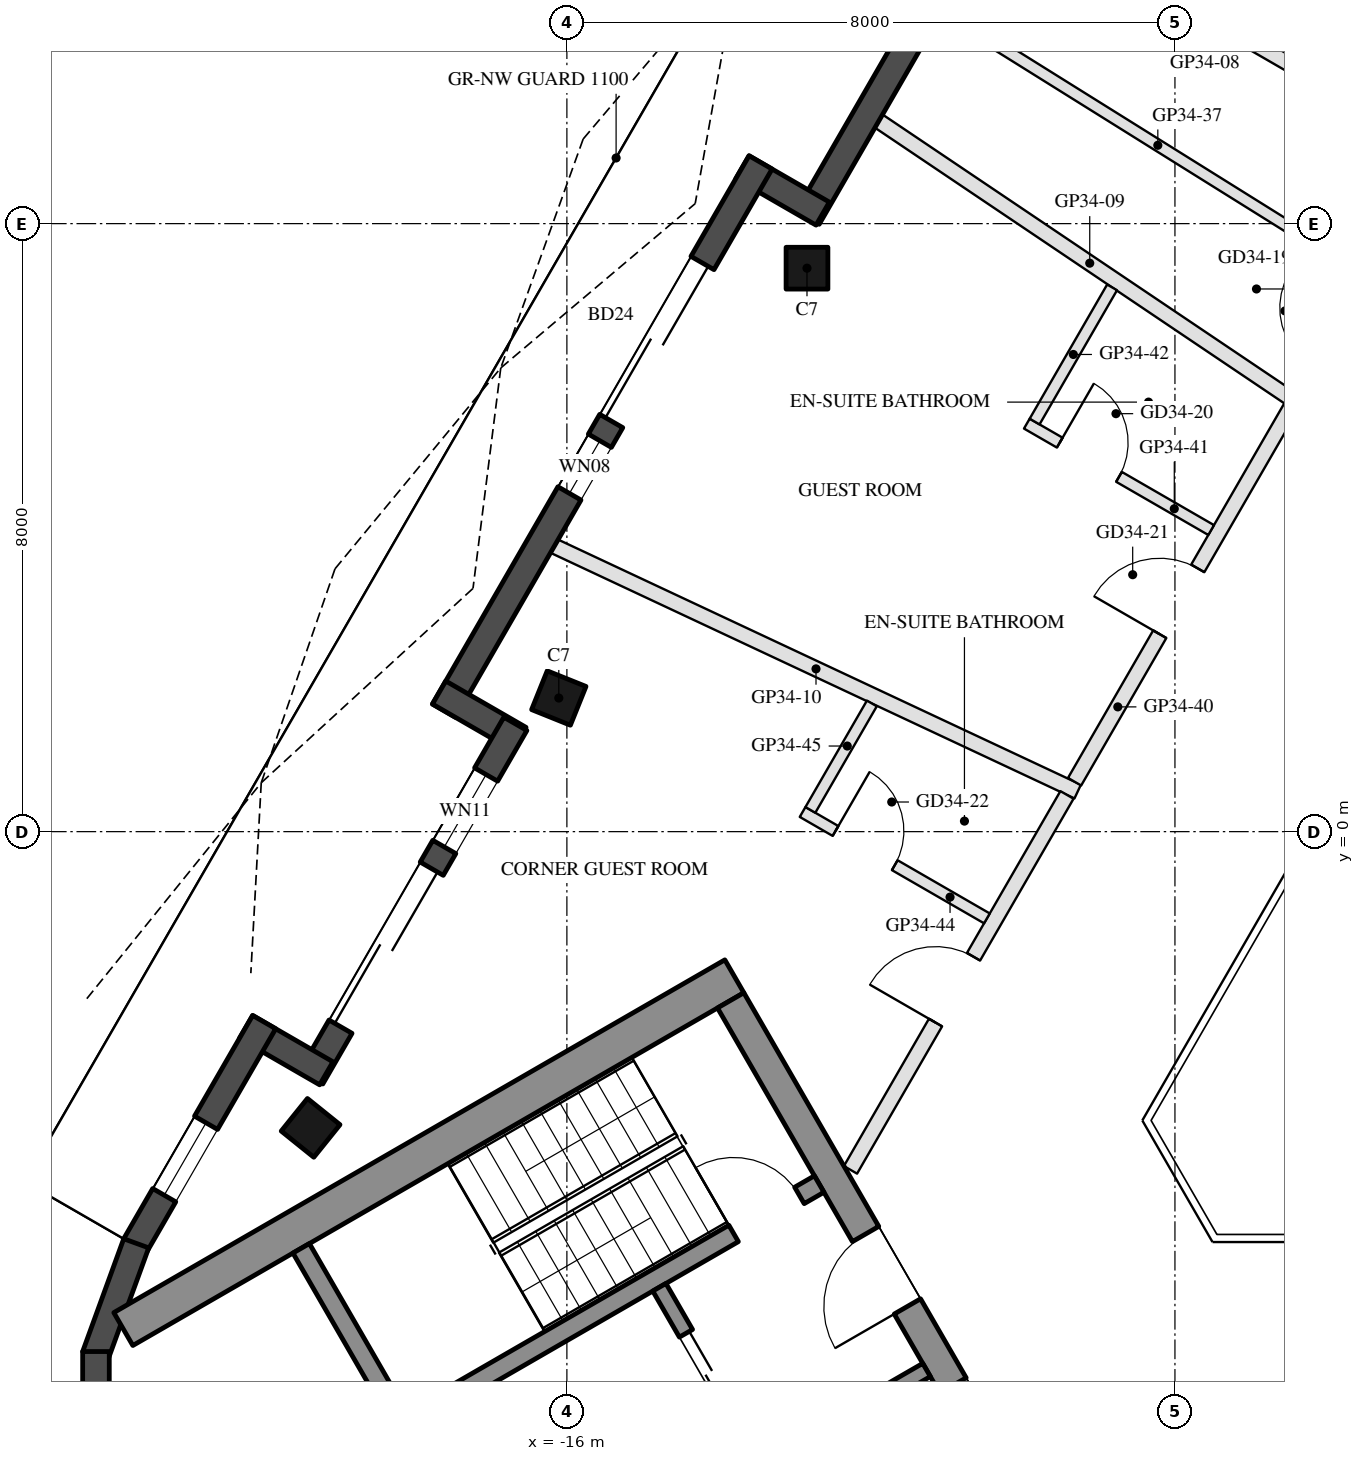
"""IFC4 building model, lengths in metres.
Left out: names, types, materials, properties, quantities, classifications, styles, units other than length and angle.
Written with IfcOpenShell. Run it as: python <this file> out.ifc"""

import sys

from ifc_helpers import new_model, si_unit, direction, frame, frame_2d, origin, origin_2d, place, context, subcontext, project, spatial, rectangle, hollow_rectangle, extrude, boolean, halfspace, element, fill, save


model = new_model("IFC4")
c1 = context("Model", 3, precision=1e-05, world=origin(), true_north=direction((0.0, 1.0)))
c2 = subcontext(c1, "Body", "Model", "MODEL_VIEW")
j1 = project(units=[si_unit("LENGTHUNIT", "METRE"), si_unit("PLANEANGLEUNIT", "RADIAN")], contexts=[c1])
p1 = place(None, origin())
s1 = spatial("IfcSite", under=j1, at=p1, CompositionType="ELEMENT")
p2 = place(p1, origin())
s2 = spatial("IfcBuilding", under=s1, at=p2, CompositionType="ELEMENT")
p3 = place(p2, frame((0.0, 0.0, 320.7)))
s3 = spatial("IfcBuildingStorey", under=s2, at=p3, CompositionType="ELEMENT", Elevation=320.7)
p4 = place(p3, frame((-12.841, 7.414, 0.0), z_axis=(0.1312281915, -0.075788846185, 0.9884509156), x_axis=(-0.500239345249, -0.865887173376, 2.1159167e-05)))
e1 = element("IfcColumn", 1, at=p4, inside=s3, PredefinedType="COLUMN", context=c2, shape_type="SweptSolid", body=[
    boolean("DIFFERENCE", boolean("DIFFERENCE", extrude(hollow_rectangle(XDim=0.55, YDim=0.55, WallThickness=0.025, at=origin_2d()), origin(), (0.0, 0.0, 1.0), 3.743), halfspace(frame((0.0, 0.0, 0.031), z_axis=(0.0, 0.0, 1.0), x_axis=(1.0, 0.0, 0.0)), True)), halfspace(frame((0.0, 0.0, 3.712), z_axis=(0.0, 0.0, 1.0), x_axis=(1.0, 0.0, 0.0)), False)),
])
p5 = place(p3, frame((-16.106, 1.758, 0.0), z_axis=(0.16132511193, -0.02291623866, 0.98663521844), x_axis=(-0.495162384909, -0.866667980787, 0.060834395287)))
e2 = element("IfcColumn", 2, at=p5, inside=s3, PredefinedType="COLUMN", context=c2, shape_type="SweptSolid", body=[
    boolean("DIFFERENCE", boolean("DIFFERENCE", extrude(hollow_rectangle(XDim=0.55, YDim=0.55, WallThickness=0.025, at=origin_2d()), origin(), (0.0, 0.0, 1.0), 3.75), halfspace(frame((0.0, 0.0, 0.034), z_axis=(0.0, 0.0, 1.0), x_axis=(1.0, 0.0, 0.0)), True)), halfspace(frame((0.0, 0.0, 3.716), z_axis=(0.0, 0.0, 1.0), x_axis=(1.0, 0.0, 0.0)), False)),
])
p6 = place(p3, frame((-19.372, -3.898, 0.0), z_axis=(0.190735471498, 0.029652697198, 0.981193506634), x_axis=(-0.48820144503, -0.864299133312, 0.121022135277)))
e3 = element("IfcColumn", 3, at=p6, inside=s3, PredefinedType="COLUMN", context=c2, shape_type="SweptSolid", body=[
    boolean("DIFFERENCE", boolean("DIFFERENCE", extrude(hollow_rectangle(XDim=0.55, YDim=0.55, WallThickness=0.025, at=origin_2d()), origin(), (0.0, 0.0, 1.0), 3.771), halfspace(frame((0.0, 0.0, 0.04), z_axis=(0.0, 0.0, 1.0), x_axis=(1.0, 0.0, 0.0)), True)), halfspace(frame((0.0, 0.0, 3.731), z_axis=(0.0, 0.0, 1.0), x_axis=(1.0, 0.0, 0.0)), False)),
])
p7 = place(p3, frame((-10.147, 12.73, 0.0), z_axis=(0.0, 0.0, 1.0), x_axis=(-0.499996591357, -0.866027371756, 0.0)))
e4 = element("IfcWall", 4, at=p7, inside=s3, PredefinedType="SOLIDWALL", context=c2, shape_type="SweptSolid", body=[
    extrude(rectangle(XDim=5.371, YDim=0.35, at=frame_2d((2.685, 0.0))), origin(), (0.0, 0.0, 1.0), 3.55),
])
p8 = place(p3, frame((-12.634, 8.132, 0.0), z_axis=(0.0, 0.0, 1.0), x_axis=(-0.866005645448, 0.500034220881, 0.0)))
e5 = element("IfcWall", 5, at=p8, inside=s3, PredefinedType="SOLIDWALL", context=c2, shape_type="SweptSolid", body=[
    extrude(rectangle(XDim=1.22, YDim=0.35, at=frame_2d((0.61, 0.0))), origin(), (0.0, 0.0, 1.0), 3.55),
])
p9 = place(p3, frame((-13.452, 8.806, 0.0), z_axis=(0.0, 0.0, 1.0), x_axis=(-0.499993893925, -0.8660289291, 0.0)))
e6 = element("IfcWall", 6, at=p9, inside=s3, PredefinedType="SOLIDWALL", context=c2, shape_type="SweptSolid", body=[
    extrude(rectangle(XDim=8.331, YDim=0.35, at=frame_2d((4.165, 0.0))), origin(), (0.0, 0.0, 1.0), 3.55),
])
p10 = place(p9, frame((1.529, 0.0, 0.0)))
e7 = element("IfcOpeningElement", 7, at=p10, cuts=e6, PredefinedType="OPENING", context=c2, shape_type="SweptSolid", body=[
    extrude(rectangle(XDim=2.4, YDim=2.4, at=frame_2d((1.2, 1.2))), frame((0.0, 0.185, 0.0), z_axis=(0.0, -1.0, 0.0), x_axis=(1.0, 0.0, 0.0)), (0.0, 0.0, 1.0), 0.37),
])
p11 = place(p9, frame((4.229, 0.0, 0.3)))
e8 = element("IfcOpeningElement", 8, at=p11, cuts=e6, PredefinedType="OPENING", context=c2, shape_type="SweptSolid", body=[
    extrude(rectangle(XDim=0.8, YDim=2.65, at=frame_2d((0.4, 1.325))), frame((0.0, 0.185, 0.0), z_axis=(0.0, -1.0, 0.0), x_axis=(1.0, 0.0, 0.0)), (0.0, 0.0, 1.0), 0.37),
])
p12 = place(p3, frame((-17.681, 1.83, 0.0), z_axis=(0.0, 0.0, 1.0), x_axis=(0.866092288191, -0.499884134912, 0.0)))
e9 = element("IfcWall", 9, at=p12, inside=s3, PredefinedType="SOLIDWALL", context=c2, shape_type="SweptSolid", body=[
    extrude(rectangle(XDim=1.22, YDim=0.35, at=frame_2d((0.61, 0.0))), origin(), (0.0, 0.0, 1.0), 3.55),
])
p13 = place(p3, frame((-16.678, 1.418, 0.0), z_axis=(0.0, 0.0, 1.0), x_axis=(-0.499996591357, -0.866027371756, 0.0)))
e10 = element("IfcWall", 10, at=p13, inside=s3, PredefinedType="SOLIDWALL", context=c2, shape_type="SweptSolid", body=[
    extrude(rectangle(XDim=5.371, YDim=0.35, at=frame_2d((2.685, 0.0))), origin(), (0.0, 0.0, 1.0), 3.55),
])
p14 = place(p13, frame((2.201, 0.0, 0.0)))
e11 = element("IfcOpeningElement", 11, at=p14, cuts=e10, PredefinedType="OPENING", context=c2, shape_type="SweptSolid", body=[
    extrude(rectangle(XDim=2.4, YDim=2.4, at=frame_2d((1.2, 1.2))), frame((0.0, 0.185, 0.0), z_axis=(0.0, -1.0, 0.0), x_axis=(1.0, 0.0, 0.0)), (0.0, 0.0, 1.0), 0.37),
])
p15 = place(p13, frame((0.77, 0.0, 0.3)))
e12 = element("IfcOpeningElement", 12, at=p15, cuts=e10, PredefinedType="OPENING", context=c2, shape_type="SweptSolid", body=[
    extrude(rectangle(XDim=1.1, YDim=2.65, at=frame_2d((0.55, 1.325))), frame((0.0, 0.185, 0.0), z_axis=(0.0, -1.0, 0.0), x_axis=(1.0, 0.0, 0.0)), (0.0, 0.0, 1.0), 0.37),
])
p16 = place(p3, frame((-19.165, -3.18, 0.0), z_axis=(0.0, 0.0, 1.0), x_axis=(-0.866005645448, 0.500034220881, 0.0)))
e13 = element("IfcWall", 13, at=p16, inside=s3, PredefinedType="SOLIDWALL", context=c2, shape_type="SweptSolid", body=[
    extrude(rectangle(XDim=1.22, YDim=0.35, at=frame_2d((0.61, 0.0))), origin(), (0.0, 0.0, 1.0), 3.55),
])
p17 = place(p3, frame((-19.982, -2.506, 0.0), z_axis=(0.0, 0.0, 1.0), x_axis=(-0.500054617923, -0.865993867816, 0.0)))
e14 = element("IfcWall", 14, at=p17, inside=s3, PredefinedType="SOLIDWALL", context=c2, shape_type="SweptSolid", body=[
    extrude(rectangle(XDim=3.393, YDim=0.35, at=frame_2d((1.697, 0.0))), origin(), (0.0, 0.0, 1.0), 3.55),
])
p18 = place(p17, frame((1.53, 0.0, 0.3)))
e15 = element("IfcOpeningElement", 15, at=p18, cuts=e14, PredefinedType="OPENING", context=c2, shape_type="SweptSolid", body=[
    extrude(rectangle(XDim=1.1, YDim=2.65, at=frame_2d((0.55, 1.325))), frame((0.0, 0.185, 0.0), z_axis=(0.0, -1.0, 0.0), x_axis=(1.0, 0.0, 0.0)), (0.0, 0.0, 1.0), 0.37),
])
for number, where, z_axis, x_axis in (
    (16, (-21.666, -5.417, 0.0), (0.0, 0.0, 1.0), (-0.342, -0.94, 0.0)),
    (17, (-22.196, -6.841, 0.0), (0.0, 0.0, 1.0), (0.0, -1.0, 0.0)),
):
    element("IfcWall", number, at=place(p3, frame(where, z_axis=z_axis, x_axis=x_axis)), inside=s3, PredefinedType="SOLIDWALL", context=c2, shape_type="SweptSolid", body=[
        extrude(rectangle(XDim=1.579, YDim=0.35, at=frame_2d((0.79, 0.0))), origin(), (0.0, 0.0, 1.0), 3.55),
    ])
p19 = place(p3, frame((-13.797, -1.903, 0.0), z_axis=(0.0, 0.0, 1.0), x_axis=(-0.866025286072, -0.500000203884, 0.0)))
e18 = element("IfcWall", 18, at=p19, inside=s3, PredefinedType="SHEAR", context=c2, shape_type="SweptSolid", body=[
    extrude(rectangle(XDim=9.283, YDim=0.5, at=frame_2d((4.641, 0.0))), origin(), (0.0, 0.0, 1.0), 3.5),
])
p20 = place(p3, frame((-13.845, -2.22, 0.0), z_axis=(0.0, 0.0, 1.0), x_axis=(0.500004234368, -0.866022959057, 0.0)))
e19 = element("IfcWall", 19, at=p20, inside=s3, PredefinedType="SHEAR", context=c2, shape_type="SweptSolid", body=[
    extrude(rectangle(XDim=10.0, YDim=0.4, at=frame_2d((5.0, 0.0))), origin(), (0.0, 0.0, 1.0), 3.5),
])
p21 = place(p20, frame((3.55, 0.0, 0.0)))
e20 = element("IfcOpeningElement", 20, at=p21, cuts=e19, PredefinedType="OPENING", context=c2, shape_type="SweptSolid", body=[
    extrude(rectangle(XDim=1.1, YDim=2.1, at=frame_2d((0.55, 1.05))), frame((0.0, 0.21, 0.0), z_axis=(0.0, -1.0, 0.0), x_axis=(1.0, 0.0, 0.0)), (0.0, 0.0, 1.0), 0.42),
])
p22 = place(p20, frame((5.85, 0.0, 0.0)))
e21 = element("IfcOpeningElement", 21, at=p22, cuts=e19, PredefinedType="OPENING", context=c2, shape_type="SweptSolid", body=[
    extrude(rectangle(XDim=1.4, YDim=2.1, at=frame_2d((0.7, 1.05))), frame((0.0, 0.21, 0.0), z_axis=(0.0, -1.0, 0.0), x_axis=(1.0, 0.0, 0.0)), (0.0, 0.0, 1.0), 0.42),
])
p23 = place(p3, frame((-12.681, -4.636, 0.0), z_axis=(0.0, 0.0, 1.0), x_axis=(-0.866021702275, -0.500006411147, 0.0)))
e22 = element("IfcWall", 22, at=p23, inside=s3, PredefinedType="SHEAR", context=c2, shape_type="SweptSolid", body=[
    extrude(rectangle(XDim=6.45, YDim=0.25, at=frame_2d((3.225, 0.0))), origin(), (0.0, 0.0, 1.0), 3.5),
])
p24 = place(p23, frame((0.3, 0.0, 0.0)))
e23 = element("IfcOpeningElement", 23, at=p24, cuts=e22, PredefinedType="OPENING", context=c2, shape_type="SweptSolid", body=[
    extrude(rectangle(XDim=1.0, YDim=2.1, at=frame_2d((0.5, 1.05))), frame((0.0, 0.135, 0.0), z_axis=(0.0, -1.0, 0.0), x_axis=(1.0, 0.0, 0.0)), (0.0, 0.0, 1.0), 0.27),
])
p25 = place(p3, frame((-19.496, -5.482, 0.0), z_axis=(0.0, 0.0, 1.0), x_axis=(0.499990435942, -0.866030925526, 0.0)))
e24 = element("IfcWall", 24, at=p25, inside=s3, PredefinedType="SHEAR", context=c2, shape_type="SweptSolid", body=[
    extrude(rectangle(XDim=2.55, YDim=0.25, at=frame_2d((1.275, 0.0))), origin(), (0.0, 0.0, 1.0), 3.5),
])
p26 = place(p3, frame((-14.783, -5.995, 0.0), z_axis=(0.0, 0.0, 1.0), x_axis=(0.49994636267, -0.866056369097, 0.0)))
e25 = element("IfcWall", 25, at=p26, inside=s3, PredefinedType="SHEAR", context=c2, shape_type="SweptSolid", body=[
    extrude(rectangle(XDim=2.8, YDim=0.2, at=frame_2d((1.4, 0.0))), origin(), (0.0, 0.0, 1.0), 3.5),
])
p27 = place(p26, frame((0.7, 0.0, 0.0)))
e26 = element("IfcOpeningElement", 26, at=p27, cuts=e25, PredefinedType="OPENING", context=c2, shape_type="SweptSolid", body=[
    extrude(rectangle(XDim=1.2, YDim=2.1, at=frame_2d((0.6, 1.05))), frame((0.0, 0.11, 0.0), z_axis=(0.0, -1.0, 0.0), x_axis=(1.0, 0.0, 0.0)), (0.0, 0.0, 1.0), 0.22),
])
p28 = place(p3, frame((-11.268, -7.083, 0.0), z_axis=(0.0, 0.0, 1.0), x_axis=(-0.866050077142, -0.499957262057, 0.0)))
e27 = element("IfcWall", 27, at=p28, inside=s3, PredefinedType="SHEAR", context=c2, shape_type="SweptSolid", body=[
    extrude(rectangle(XDim=2.4, YDim=0.2, at=frame_2d((1.2, 0.0))), origin(), (0.0, 0.0, 1.0), 3.5),
])
p29 = place(p3, frame((-10.221, 12.252, 0.0), z_axis=(0.0, 0.0, 1.0), x_axis=(0.866020588255, -0.50000834065, 0.0)))
e28 = element("IfcWall", 28, at=p29, inside=s3, PredefinedType="PARTITIONING", context=c2, shape_type="SweptSolid", body=[
    extrude(rectangle(XDim=6.678, YDim=0.2, at=frame_2d((3.339, 0.0))), origin(), (0.0, 0.0, 1.0), 3.1),
])
p30 = place(p3, frame((-11.897, 9.349, 0.0), z_axis=(0.0, 0.0, 1.0), x_axis=(0.829476932463, -0.558540972992, 0.0)))
e29 = element("IfcWall", 29, at=p30, inside=s3, PredefinedType="PARTITIONING", context=c2, shape_type="SweptSolid", body=[
    extrude(rectangle(XDim=6.693, YDim=0.2, at=frame_2d((3.347, 0.0))), origin(), (0.0, 0.0, 1.0), 3.1),
])
p31 = place(p3, frame((-16.165, 3.756, 0.0), z_axis=(0.0, 0.0, 1.0), x_axis=(0.905429632533, -0.42449638459, 0.0)))
e30 = element("IfcWall", 30, at=p31, inside=s3, PredefinedType="PARTITIONING", context=c2, shape_type="SweptSolid", body=[
    extrude(rectangle(XDim=7.605, YDim=0.2, at=frame_2d((3.802, 0.0))), origin(), (0.0, 0.0, 1.0), 3.1),
])
p32 = place(p3, frame((-11.059, 10.8, 0.0), z_axis=(0.0, 0.0, 1.0), x_axis=(0.848240447151, -0.529611313906, 0.0)))
e31 = element("IfcWall", 31, at=p32, inside=s3, PredefinedType="PARTITIONING", context=c2, shape_type="SweptSolid", body=[
    extrude(rectangle(XDim=6.681, YDim=0.15, at=frame_2d((3.341, 0.0))), origin(), (0.0, 0.0, 1.0), 3.1),
])
p33 = place(p3, frame((-9.32, 0.657, 0.0), z_axis=(0.0, 0.0, 1.0), x_axis=(0.500014943438, 0.866016776015, 0.0)))
e32 = element("IfcWall", 32, at=p33, inside=s3, PredefinedType="PARTITIONING", context=c2, shape_type="SweptSolid", body=[
    extrude(rectangle(XDim=5.684, YDim=0.2, at=frame_2d((2.842, 0.0))), origin(), (0.0, 0.0, 1.0), 3.15),
])
p34 = place(p33, frame((2.241, 0.0, 0.0)))
e33 = element("IfcOpeningElement", 33, at=p34, cuts=e32, PredefinedType="OPENING", context=c2, shape_type="SweptSolid", body=[
    extrude(rectangle(XDim=1.0, YDim=2.1, at=frame_2d((0.5, 1.05))), frame((0.0, 0.11, 0.0), z_axis=(0.0, -1.0, 0.0), x_axis=(1.0, 0.0, 0.0)), (0.0, 0.0, 1.0), 0.22),
])
p35 = place(p3, frame((-9.949, 5.368, 0.0), z_axis=(0.0, 0.0, 1.0), x_axis=(0.866018616679, -0.500011755427, 0.0)))
e34 = element("IfcWall", 34, at=p35, inside=s3, PredefinedType="PARTITIONING", context=c2, shape_type="SweptSolid", body=[
    extrude(rectangle(XDim=2.8, YDim=0.15, at=frame_2d((1.4, 0.0))), origin(), (0.0, 0.0, 1.0), 3.55),
])
p36 = place(p35, frame((0.5, 0.0, 0.0)))
e35 = element("IfcOpeningElement", 35, at=p36, cuts=e34, PredefinedType="OPENING", context=c2, shape_type="SweptSolid", body=[
    extrude(rectangle(XDim=0.9, YDim=2.1, at=frame_2d((0.45, 1.05))), frame((0.0, 0.085, 0.0), z_axis=(0.0, -1.0, 0.0), x_axis=(1.0, 0.0, 0.0)), (0.0, 0.0, 1.0), 0.17),
])
p37 = place(p3, frame((-8.827, 7.161, 0.0), z_axis=(0.0, 0.0, 1.0), x_axis=(-0.499926356982, -0.866067917426, 0.0)))
e36 = element("IfcWall", 36, at=p37, inside=s3, PredefinedType="PARTITIONING", context=c2, shape_type="SweptSolid", body=[
    extrude(rectangle(XDim=2.038, YDim=0.15, at=frame_2d((1.019, 0.0))), origin(), (0.0, 0.0, 1.0), 3.15),
])
p38 = place(p3, frame((-12.269, -4.45, 0.0), z_axis=(0.0, 0.0, 1.0), x_axis=(0.500034087201, 0.866005722635, 0.0)))
e37 = element("IfcWall", 37, at=p38, inside=s3, PredefinedType="PARTITIONING", context=c2, shape_type="SweptSolid", body=[
    extrude(rectangle(XDim=5.696, YDim=0.2, at=frame_2d((2.848, 0.0))), origin(), (0.0, 0.0, 1.0), 3.15),
])
p39 = place(p38, frame((2.238, 0.0, 0.0)))
e38 = element("IfcOpeningElement", 38, at=p39, cuts=e37, PredefinedType="OPENING", context=c2, shape_type="SweptSolid", body=[
    extrude(rectangle(XDim=1.0, YDim=2.1, at=frame_2d((0.5, 1.05))), frame((0.0, 0.11, 0.0), z_axis=(0.0, -1.0, 0.0), x_axis=(1.0, 0.0, 0.0)), (0.0, 0.0, 1.0), 0.22),
])
p40 = place(p3, frame((-12.899, 0.259, 0.0), z_axis=(0.0, 0.0, 1.0), x_axis=(0.865996816683, -0.500049511043, 0.0)))
e39 = element("IfcWall", 39, at=p40, inside=s3, PredefinedType="PARTITIONING", context=c2, shape_type="SweptSolid", body=[
    extrude(rectangle(XDim=2.8, YDim=0.15, at=frame_2d((1.4, 0.0))), origin(), (0.0, 0.0, 1.0), 3.15),
])
p41 = place(p40, frame((0.5, 0.0, 0.0)))
e40 = element("IfcOpeningElement", 40, at=p41, cuts=e39, PredefinedType="OPENING", context=c2, shape_type="SweptSolid", body=[
    extrude(rectangle(XDim=0.9, YDim=2.1, at=frame_2d((0.45, 1.05))), frame((0.0, 0.085, 0.0), z_axis=(0.0, -1.0, 0.0), x_axis=(1.0, 0.0, 0.0)), (0.0, 0.0, 1.0), 0.17),
])
p42 = place(p3, frame((-11.988, 1.687, 0.0), z_axis=(0.0, 0.0, 1.0), x_axis=(-0.4999707335, -0.866042300147, 0.0)))
e41 = element("IfcWall", 41, at=p42, inside=s3, PredefinedType="PARTITIONING", context=c2, shape_type="SweptSolid", body=[
    extrude(rectangle(XDim=1.617, YDim=0.15, at=frame_2d((0.809, 0.0))), origin(), (0.0, 0.0, 1.0), 3.55),
])
p43 = place(p10, frame((2.4, 0.0, 0.0), z_axis=(0.0, 0.0, 1.0), x_axis=(-1.0, 0.0, 0.0)))
e42 = element("IfcDoor", 42, at=p43, inside=s3, OperationType="SLIDING_TO_LEFT", PredefinedType="DOOR", context=c2, shape_type="SweptSolid", body=[
    extrude(rectangle(XDim=2.4, YDim=2.4, at=frame_2d((1.2, 1.2))), frame((0.0, 0.025, 0.0), z_axis=(0.0, -1.0, 0.0), x_axis=(1.0, 0.0, 0.0)), (0.0, 0.0, 1.0), 0.05),
])
fill(e7, e42)
p44 = place(p11, origin())
e43 = element("IfcWindow", 43, at=p44, inside=s3, PartitioningType="SINGLE_PANEL", PredefinedType="WINDOW", context=c2, shape_type="SweptSolid", body=[
    extrude(rectangle(XDim=0.8, YDim=2.65, at=frame_2d((0.4, 1.325))), frame((0.0, 0.03, 0.0), z_axis=(0.0, -1.0, 0.0), x_axis=(1.0, 0.0, 0.0)), (0.0, 0.0, 1.0), 0.06),
])
fill(e8, e43)
p45 = place(p14, frame((2.4, 0.0, 0.0), z_axis=(0.0, 0.0, 1.0), x_axis=(-1.0, 0.0, 0.0)))
e44 = element("IfcDoor", 44, at=p45, inside=s3, OperationType="SLIDING_TO_LEFT", PredefinedType="DOOR", context=c2, shape_type="SweptSolid", body=[
    extrude(rectangle(XDim=2.4, YDim=2.4, at=frame_2d((1.2, 1.2))), frame((0.0, 0.025, 0.0), z_axis=(0.0, -1.0, 0.0), x_axis=(1.0, 0.0, 0.0)), (0.0, 0.0, 1.0), 0.05),
])
fill(e11, e44)
p46 = place(p15, origin())
e45 = element("IfcWindow", 45, at=p46, inside=s3, PartitioningType="SINGLE_PANEL", PredefinedType="WINDOW", context=c2, shape_type="SweptSolid", body=[
    extrude(rectangle(XDim=1.1, YDim=2.65, at=frame_2d((0.55, 1.325))), frame((0.0, 0.03, 0.0), z_axis=(0.0, -1.0, 0.0), x_axis=(1.0, 0.0, 0.0)), (0.0, 0.0, 1.0), 0.06),
])
fill(e12, e45)
p47 = place(p18, origin())
e46 = element("IfcWindow", 46, at=p47, inside=s3, PartitioningType="SINGLE_PANEL", PredefinedType="WINDOW", context=c2, shape_type="SweptSolid", body=[
    extrude(rectangle(XDim=1.1, YDim=2.65, at=frame_2d((0.55, 1.325))), frame((0.0, 0.03, 0.0), z_axis=(0.0, -1.0, 0.0), x_axis=(1.0, 0.0, 0.0)), (0.0, 0.0, 1.0), 0.06),
])
fill(e15, e46)
p48 = place(p27, origin())
e47 = element("IfcDoor", 47, at=p48, inside=s3, OperationType="DOUBLE_DOOR_SLIDING", PredefinedType="DOOR", context=c2, shape_type="SweptSolid", body=[
    extrude(rectangle(XDim=1.2, YDim=2.1, at=frame_2d((0.6, 1.05))), frame((0.0, 0.025, 0.0), z_axis=(0.0, -1.0, 0.0), x_axis=(1.0, 0.0, 0.0)), (0.0, 0.0, 1.0), 0.05),
])
fill(e26, e47)
p49 = place(p21, frame((1.1, 0.0, 0.0), z_axis=(0.0, 0.0, 1.0), x_axis=(-1.0, 0.0, 0.0)))
e48 = element("IfcDoor", 48, at=p49, inside=s3, OperationType="SINGLE_SWING_LEFT", PredefinedType="DOOR", context=c2, shape_type="SweptSolid", body=[
    extrude(rectangle(XDim=1.1, YDim=2.1, at=frame_2d((0.55, 1.05))), frame((0.0, 0.025, 0.0), z_axis=(0.0, -1.0, 0.0), x_axis=(1.0, 0.0, 0.0)), (0.0, 0.0, 1.0), 0.05),
])
fill(e20, e48)
p50 = place(p24, frame((1.0, 0.0, 0.0), z_axis=(0.0, 0.0, 1.0), x_axis=(-1.0, 0.0, 0.0)))
e49 = element("IfcDoor", 49, at=p50, inside=s3, OperationType="SINGLE_SWING_LEFT", PredefinedType="DOOR", context=c2, shape_type="SweptSolid", body=[
    extrude(rectangle(XDim=1.0, YDim=2.1, at=frame_2d((0.5, 1.05))), frame((0.0, 0.025, 0.0), z_axis=(0.0, -1.0, 0.0), x_axis=(1.0, 0.0, 0.0)), (0.0, 0.0, 1.0), 0.05),
])
fill(e23, e49)
p51 = place(p36, origin())
e50 = element("IfcDoor", 50, at=p51, inside=s3, OperationType="SINGLE_SWING_LEFT", PredefinedType="DOOR", context=c2, shape_type="SweptSolid", body=[
    extrude(rectangle(XDim=0.9, YDim=2.1, at=frame_2d((0.45, 1.05))), frame((0.0, 0.025, 0.0), z_axis=(0.0, -1.0, 0.0), x_axis=(1.0, 0.0, 0.0)), (0.0, 0.0, 1.0), 0.05),
])
fill(e35, e50)
p52 = place(p34, origin())
e51 = element("IfcDoor", 51, at=p52, inside=s3, OperationType="SINGLE_SWING_LEFT", PredefinedType="DOOR", context=c2, shape_type="SweptSolid", body=[
    extrude(rectangle(XDim=1.0, YDim=2.1, at=frame_2d((0.5, 1.05))), frame((0.0, 0.025, 0.0), z_axis=(0.0, -1.0, 0.0), x_axis=(1.0, 0.0, 0.0)), (0.0, 0.0, 1.0), 0.05),
])
fill(e33, e51)
p53 = place(p41, origin())
e52 = element("IfcDoor", 52, at=p53, inside=s3, OperationType="SINGLE_SWING_LEFT", PredefinedType="DOOR", context=c2, shape_type="SweptSolid", body=[
    extrude(rectangle(XDim=0.9, YDim=2.1, at=frame_2d((0.45, 1.05))), frame((0.0, 0.025, 0.0), z_axis=(0.0, -1.0, 0.0), x_axis=(1.0, 0.0, 0.0)), (0.0, 0.0, 1.0), 0.05),
])
fill(e40, e52)
p54 = place(p39, origin())
e53 = element("IfcDoor", 53, at=p54, inside=s3, OperationType="SINGLE_SWING_LEFT", PredefinedType="DOOR", context=c2, shape_type="SweptSolid", body=[
    extrude(rectangle(XDim=1.0, YDim=2.1, at=frame_2d((0.5, 1.05))), frame((0.0, 0.025, 0.0), z_axis=(0.0, -1.0, 0.0), x_axis=(1.0, 0.0, 0.0)), (0.0, 0.0, 1.0), 0.05),
])
fill(e38, e53)
save(model, sys.argv[1])
